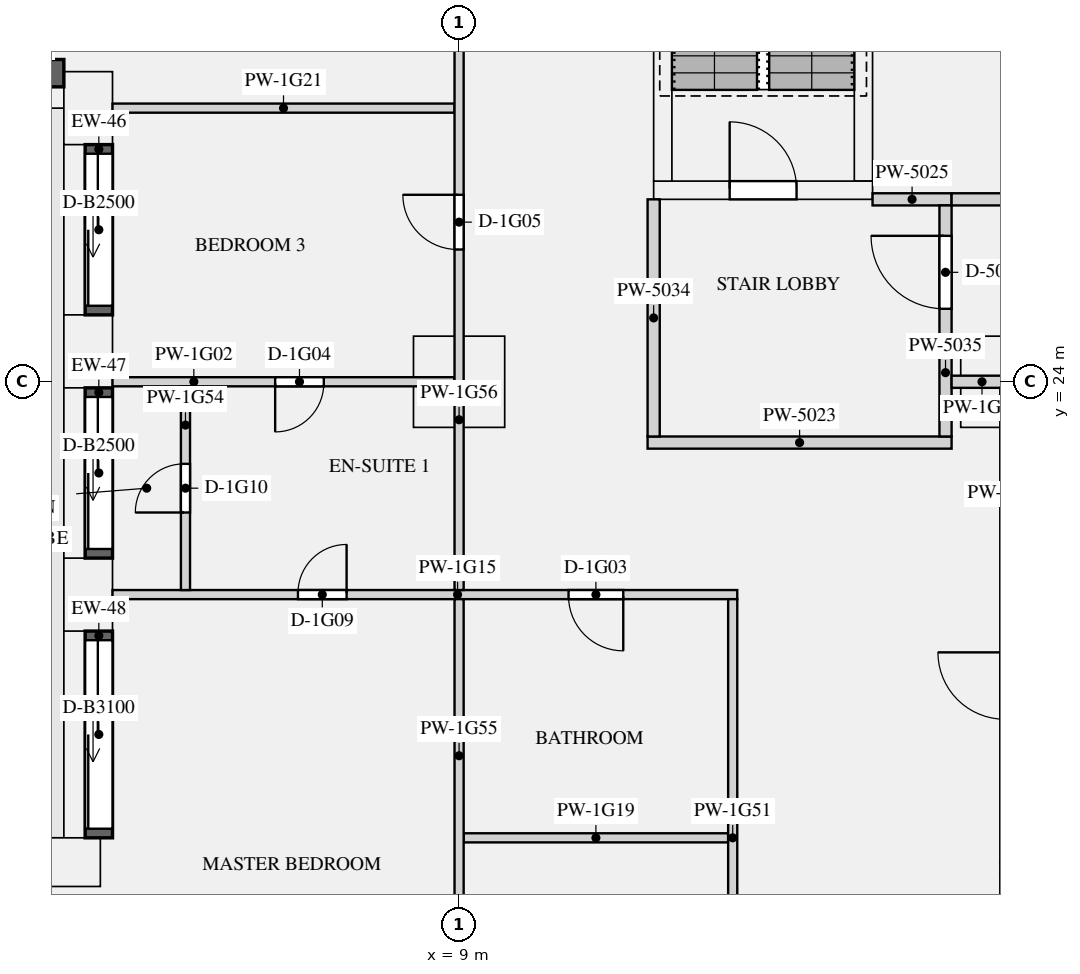
"""IFC4 building model, lengths in metres.
Left out: names, types, materials, properties, quantities, classifications, styles, units other than length and angle.
Written with IfcOpenShell. Run it as: python <this file> out.ifc"""

import sys

from ifc_helpers import new_model, si_unit, direction, frame, frame_2d, origin, origin_2d, place, context, subcontext, project, spatial, rectangle, extrude, element, fill, save


model = new_model("IFC4")
c1 = context("Model", 3, precision=1e-05, world=origin(), true_north=direction((0.0, 1.0)))
c2 = subcontext(c1, "Body", "Model", "MODEL_VIEW")
j1 = project(units=[si_unit("LENGTHUNIT", "METRE"), si_unit("PLANEANGLEUNIT", "RADIAN")], contexts=[c1])
p1 = place(None, origin())
s1 = spatial("IfcSite", under=j1, at=p1, CompositionType="ELEMENT")
p2 = place(p1, origin())
s2 = spatial("IfcBuilding", under=s1, at=p2, CompositionType="ELEMENT")
p3 = place(p2, frame((0.0, 0.0, 69.9)))
s3 = spatial("IfcBuildingStorey", under=s2, at=p3, CompositionType="ELEMENT", Elevation=69.9)
for number, where, z_axis, x_axis in (
    (1, (2.9, 28.5, 0.0), (0.0, 0.0, 1.0), (0.0, -1.0, 0.0)),
    (2, (2.9, 24.5, 0.0), (0.0, 0.0, 1.0), (0.0, -1.0, 0.0)),
    (3, (2.9, 20.5, 0.0), (0.0, 0.0, 1.0), (0.0, -1.0, 0.0)),
    (4, (2.5, 16.1, 0.0), (0.0, 0.0, 1.0), (-1.0, 0.0, 0.0)),
):
    element("IfcColumn", number, at=place(p3, frame(where, z_axis=z_axis, x_axis=x_axis)), inside=s3, PredefinedType="USERDEFINED", context=c2, shape_type="SweptSolid", body=[
        extrude(rectangle(XDim=1.2, YDim=0.8, at=origin_2d()), origin(), (0.0, 0.0, 1.0), 2.65),
    ])
for number, where, z_axis, x_axis in (
    (5, (9.0, 24.0, 0.0), (0.0, 0.0, 1.0), (1.0, 0.0, 0.0)),
    (6, (18.0, 24.0, 0.0), (0.0, 0.0, 1.0), (1.0, 0.0, 0.0)),
):
    element("IfcColumn", number, at=place(p3, frame(where, z_axis=z_axis, x_axis=x_axis)), inside=s3, PredefinedType="COLUMN", context=c2, shape_type="SweptSolid", body=[
        extrude(rectangle(XDim=1.5, YDim=1.5, at=origin_2d()), origin(), (0.0, 0.0, 1.0), 3.15),
    ])
p4 = place(p3, frame((12.2, 27.15, 0.0), z_axis=(0.0, 0.0, 1.0), x_axis=(1.0, 0.0, 0.0)))
e7 = element("IfcWall", 7, at=p4, inside=s3, PredefinedType="SHEAR", context=c2, shape_type="SweptSolid", body=[
    extrude(rectangle(XDim=3.6, YDim=0.3, at=frame_2d((1.8, 0.0))), origin(), (0.0, 0.0, 1.0), 3.15),
])
p5 = place(p4, frame((1.25, 0.0, 0.0)))
e8 = element("IfcOpeningElement", 8, at=p5, cuts=e7, PredefinedType="OPENING", context=c2, shape_type="SweptSolid", body=[
    extrude(rectangle(XDim=1.1, YDim=2.1, at=frame_2d((0.55, 1.05))), frame((0.0, 0.16, 0.0), z_axis=(0.0, -1.0, 0.0), x_axis=(1.0, 0.0, 0.0)), (0.0, 0.0, 1.0), 0.32),
])
for number, where, z_axis, x_axis in (
    (9, (12.35, 27.3, 0.0), (0.0, 0.0, 1.0), (0.0, 1.0, 0.0)),
    (10, (15.65, 27.3, 0.0), (0.0, 0.0, 1.0), (0.0, 1.0, 0.0)),
):
    element("IfcWall", number, at=place(p3, frame(where, z_axis=z_axis, x_axis=x_axis)), inside=s3, PredefinedType="SHEAR", context=c2, shape_type="SweptSolid", body=[
        extrude(rectangle(XDim=7.8, YDim=0.3, at=frame_2d((3.9, 0.0))), origin(), (0.0, 0.0, 1.0), 3.15),
    ])
p6 = place(p3, frame((1.2, 29.075, 0.9), z_axis=(0.0, 0.0, 1.0), x_axis=(1.0, 0.0, 0.0)))
e11 = element("IfcWall", 11, at=p6, inside=s3, PredefinedType="SOLIDWALL", context=c2, shape_type="SweptSolid", body=[
    extrude(rectangle(XDim=1.3, YDim=0.45, at=frame_2d((0.65, 0.0))), origin(), (0.0, 0.0, 1.0), 1.75),
])
p7 = place(p3, frame((3.075, 27.9, 0.0), z_axis=(0.0, 0.0, 1.0), x_axis=(0.0, -1.0, 0.0)))
e12 = element("IfcWall", 12, at=p7, inside=s3, PredefinedType="SOLIDWALL", context=c2, shape_type="SweptSolid", body=[
    extrude(rectangle(XDim=2.8, YDim=0.45, at=frame_2d((1.4, 0.0))), origin(), (0.0, 0.0, 1.0), 2.65),
])
p8 = place(p7, frame((0.15, 0.0, 0.0)))
e13 = element("IfcOpeningElement", 13, at=p8, cuts=e12, PredefinedType="OPENING", context=c2, shape_type="SweptSolid", body=[
    extrude(rectangle(XDim=2.5, YDim=2.3, at=frame_2d((1.25, 1.15))), frame((0.0, 0.235, 0.0), z_axis=(0.0, -1.0, 0.0), x_axis=(1.0, 0.0, 0.0)), (0.0, 0.0, 1.0), 0.47),
])
p9 = place(p3, frame((3.075, 23.9, 0.0), z_axis=(0.0, 0.0, 1.0), x_axis=(0.0, -1.0, 0.0)))
e14 = element("IfcWall", 14, at=p9, inside=s3, PredefinedType="SOLIDWALL", context=c2, shape_type="SweptSolid", body=[
    extrude(rectangle(XDim=2.8, YDim=0.45, at=frame_2d((1.4, 0.0))), origin(), (0.0, 0.0, 1.0), 2.65),
])
p10 = place(p9, frame((0.15, 0.0, 0.0)))
e15 = element("IfcOpeningElement", 15, at=p10, cuts=e14, PredefinedType="OPENING", context=c2, shape_type="SweptSolid", body=[
    extrude(rectangle(XDim=2.5, YDim=2.3, at=frame_2d((1.25, 1.15))), frame((0.0, 0.235, 0.0), z_axis=(0.0, -1.0, 0.0), x_axis=(1.0, 0.0, 0.0)), (0.0, 0.0, 1.0), 0.47),
])
p11 = place(p3, frame((3.075, 19.9, 0.0), z_axis=(0.0, 0.0, 1.0), x_axis=(0.0, -1.0, 0.0)))
e16 = element("IfcWall", 16, at=p11, inside=s3, PredefinedType="SOLIDWALL", context=c2, shape_type="SweptSolid", body=[
    extrude(rectangle(XDim=3.4, YDim=0.45, at=frame_2d((1.7, 0.0))), origin(), (0.0, 0.0, 1.0), 2.65),
])
p12 = place(p11, frame((0.15, 0.0, 0.0)))
e17 = element("IfcOpeningElement", 17, at=p12, cuts=e16, PredefinedType="OPENING", context=c2, shape_type="SweptSolid", body=[
    extrude(rectangle(XDim=3.1, YDim=2.3, at=frame_2d((1.55, 1.15))), frame((0.0, 0.235, 0.0), z_axis=(0.0, -1.0, 0.0), x_axis=(1.0, 0.0, 0.0)), (0.0, 0.0, 1.0), 0.47),
])
p13 = place(p3, frame((12.1, 23.0, 0.0), z_axis=(0.0, 0.0, 1.0), x_axis=(1.0, 0.0, 0.0)))
e18 = element("IfcWall", 18, at=p13, inside=s3, PredefinedType="PARTITIONING", context=c2, shape_type="SweptSolid", body=[
    extrude(rectangle(XDim=5.0, YDim=0.2, at=frame_2d((2.5, 0.0))), origin(), (0.0, 0.0, 1.0), 2.65),
])
p14 = place(p3, frame((15.8, 27.0, 0.0), z_axis=(0.0, 0.0, 1.0), x_axis=(1.0, 0.0, 0.0)))
e19 = element("IfcWall", 19, at=p14, inside=s3, PredefinedType="PARTITIONING", context=c2, shape_type="SweptSolid", body=[
    extrude(rectangle(XDim=1.3, YDim=0.2, at=frame_2d((0.65, 0.0))), origin(), (0.0, 0.0, 1.0), 2.65),
])
p15 = place(p3, frame((12.2, 23.1, 0.0), z_axis=(0.0, 0.0, 1.0), x_axis=(0.0, 1.0, 0.0)))
e20 = element("IfcWall", 20, at=p15, inside=s3, PredefinedType="PARTITIONING", context=c2, shape_type="SweptSolid", body=[
    extrude(rectangle(XDim=3.9, YDim=0.2, at=frame_2d((1.95, 0.0))), origin(), (0.0, 0.0, 1.0), 2.65),
])
p16 = place(p3, frame((17.0, 23.1, 0.0), z_axis=(0.0, 0.0, 1.0), x_axis=(0.0, 1.0, 0.0)))
e21 = element("IfcWall", 21, at=p16, inside=s3, PredefinedType="PARTITIONING", context=c2, shape_type="SweptSolid", body=[
    extrude(rectangle(XDim=3.8, YDim=0.2, at=frame_2d((1.9, 0.0))), origin(), (0.0, 0.0, 1.0), 2.65),
])
p17 = place(p16, frame((2.1, 0.0, 0.0)))
e22 = element("IfcOpeningElement", 22, at=p17, cuts=e21, PredefinedType="OPENING", context=c2, shape_type="SweptSolid", body=[
    extrude(rectangle(XDim=1.2, YDim=2.1, at=frame_2d((0.6, 1.05))), frame((0.0, 0.11, 0.0), z_axis=(0.0, -1.0, 0.0), x_axis=(1.0, 0.0, 0.0)), (0.0, 0.0, 1.0), 0.22),
])
p18 = place(p3, frame((3.3, 24.0, 0.0), z_axis=(0.0, 0.0, 1.0), x_axis=(1.0, 0.0, 0.0)))
e23 = element("IfcWall", 23, at=p18, inside=s3, PredefinedType="PARTITIONING", context=c2, shape_type="SweptSolid", body=[
    extrude(rectangle(XDim=5.625, YDim=0.15, at=frame_2d((2.812, 0.0))), origin(), (0.0, 0.0, 1.0), 2.65),
])
p19 = place(p18, frame((2.675, 0.0, 0.0)))
e24 = element("IfcOpeningElement", 24, at=p19, cuts=e23, PredefinedType="OPENING", context=c2, shape_type="SweptSolid", body=[
    extrude(rectangle(XDim=0.8, YDim=2.1, at=frame_2d((0.4, 1.05))), frame((0.0, 0.085, 0.0), z_axis=(0.0, -1.0, 0.0), x_axis=(1.0, 0.0, 0.0)), (0.0, 0.0, 1.0), 0.17),
])
p20 = place(p3, frame((17.1, 24.0, 0.0), z_axis=(0.0, 0.0, 1.0), x_axis=(1.0, 0.0, 0.0)))
e25 = element("IfcWall", 25, at=p20, inside=s3, PredefinedType="PARTITIONING", context=c2, shape_type="SweptSolid", body=[
    extrude(rectangle(XDim=1.0, YDim=0.2, at=frame_2d((0.5, 0.0))), origin(), (0.0, 0.0, 1.0), 2.65),
])
p21 = place(p3, frame((17.1, 27.0, 0.0), z_axis=(0.0, 0.0, 1.0), x_axis=(1.0, 0.0, 0.0)))
e26 = element("IfcWall", 26, at=p21, inside=s3, PredefinedType="PARTITIONING", context=c2, shape_type="SweptSolid", body=[
    extrude(rectangle(XDim=7.0, YDim=0.2, at=frame_2d((3.5, 0.0))), origin(), (0.0, 0.0, 1.0), 2.65),
])
p22 = place(p3, frame((3.3, 20.5, 0.0), z_axis=(0.0, 0.0, 1.0), x_axis=(1.0, 0.0, 0.0)))
e27 = element("IfcWall", 27, at=p22, inside=s3, PredefinedType="PARTITIONING", context=c2, shape_type="SweptSolid", body=[
    extrude(rectangle(XDim=10.275, YDim=0.15, at=frame_2d((5.137, 0.0))), origin(), (0.0, 0.0, 1.0), 2.65),
])
p23 = place(p22, frame((7.5, 0.0, 0.0)))
e28 = element("IfcOpeningElement", 28, at=p23, cuts=e27, PredefinedType="OPENING", context=c2, shape_type="SweptSolid", body=[
    extrude(rectangle(XDim=0.9, YDim=2.1, at=frame_2d((0.45, 1.05))), frame((0.0, 0.085, 0.0), z_axis=(0.0, -1.0, 0.0), x_axis=(1.0, 0.0, 0.0)), (0.0, 0.0, 1.0), 0.17),
])
p24 = place(p22, frame((3.05, 0.0, 0.0)))
e29 = element("IfcOpeningElement", 29, at=p24, cuts=e27, PredefinedType="OPENING", context=c2, shape_type="SweptSolid", body=[
    extrude(rectangle(XDim=0.8, YDim=2.1, at=frame_2d((0.4, 1.05))), frame((0.0, 0.085, 0.0), z_axis=(0.0, -1.0, 0.0), x_axis=(1.0, 0.0, 0.0)), (0.0, 0.0, 1.0), 0.17),
])
p25 = place(p3, frame((9.075, 16.5, 0.0), z_axis=(0.0, 0.0, 1.0), x_axis=(1.0, 0.0, 0.0)))
e30 = element("IfcWall", 30, at=p25, inside=s3, PredefinedType="PARTITIONING", context=c2, shape_type="SweptSolid", body=[
    extrude(rectangle(XDim=4.35, YDim=0.15, at=frame_2d((2.175, 0.0))), origin(), (0.0, 0.0, 1.0), 2.65),
])
p26 = place(p3, frame((3.3, 28.5, 0.0), z_axis=(0.0, 0.0, 1.0), x_axis=(1.0, 0.0, 0.0)))
e31 = element("IfcWall", 31, at=p26, inside=s3, PredefinedType="PARTITIONING", context=c2, shape_type="SweptSolid", body=[
    extrude(rectangle(XDim=5.625, YDim=0.15, at=frame_2d((2.812, 0.0))), origin(), (0.0, 0.0, 1.0), 2.65),
])
p27 = place(p3, frame((13.5, 12.575, 0.0), z_axis=(0.0, 0.0, 1.0), x_axis=(0.0, 1.0, 0.0)))
e32 = element("IfcWall", 32, at=p27, inside=s3, PredefinedType="PARTITIONING", context=c2, shape_type="SweptSolid", body=[
    extrude(rectangle(XDim=7.85, YDim=0.15, at=frame_2d((3.925, 0.0))), origin(), (0.0, 0.0, 1.0), 2.65),
])
p28 = place(p3, frame((4.5, 20.575, 0.0), z_axis=(0.0, 0.0, 1.0), x_axis=(0.0, 1.0, 0.0)))
e33 = element("IfcWall", 33, at=p28, inside=s3, PredefinedType="PARTITIONING", context=c2, shape_type="SweptSolid", body=[
    extrude(rectangle(XDim=3.35, YDim=0.15, at=frame_2d((1.675, 0.0))), origin(), (0.0, 0.0, 1.0), 2.65),
])
p29 = place(p28, frame((1.275, 0.0, 0.0)))
e34 = element("IfcOpeningElement", 34, at=p29, cuts=e33, PredefinedType="OPENING", context=c2, shape_type="SweptSolid", body=[
    extrude(rectangle(XDim=0.8, YDim=2.1, at=frame_2d((0.4, 1.05))), frame((0.0, 0.085, 0.0), z_axis=(0.0, -1.0, 0.0), x_axis=(1.0, 0.0, 0.0)), (0.0, 0.0, 1.0), 0.17),
])
p30 = place(p3, frame((9.0, 12.575, 0.0), z_axis=(0.0, 0.0, 1.0), x_axis=(0.0, 1.0, 0.0)))
e35 = element("IfcWall", 35, at=p30, inside=s3, PredefinedType="PARTITIONING", context=c2, shape_type="SweptSolid", body=[
    extrude(rectangle(XDim=7.85, YDim=0.15, at=frame_2d((3.925, 0.0))), origin(), (0.0, 0.0, 1.0), 2.65),
])
p31 = place(p30, frame((1.9, 0.0, 0.0)))
e36 = element("IfcOpeningElement", 36, at=p31, cuts=e35, PredefinedType="OPENING", context=c2, shape_type="SweptSolid", body=[
    extrude(rectangle(XDim=0.8, YDim=2.1, at=frame_2d((0.4, 1.05))), frame((0.0, 0.085, 0.0), z_axis=(0.0, -1.0, 0.0), x_axis=(1.0, 0.0, 0.0)), (0.0, 0.0, 1.0), 0.17),
])
p32 = place(p3, frame((9.0, 20.575, 0.0), z_axis=(0.0, 0.0, 1.0), x_axis=(0.0, 1.0, 0.0)))
e37 = element("IfcWall", 37, at=p32, inside=s3, PredefinedType="PARTITIONING", context=c2, shape_type="SweptSolid", body=[
    extrude(rectangle(XDim=11.725, YDim=0.15, at=frame_2d((5.863, 0.0))), origin(), (0.0, 0.0, 1.0), 2.65),
])
p33 = place(p32, frame((5.6, 0.0, 0.0)))
e38 = element("IfcOpeningElement", 38, at=p33, cuts=e37, PredefinedType="OPENING", context=c2, shape_type="SweptSolid", body=[
    extrude(rectangle(XDim=0.9, YDim=2.1, at=frame_2d((0.45, 1.05))), frame((0.0, 0.085, 0.0), z_axis=(0.0, -1.0, 0.0), x_axis=(1.0, 0.0, 0.0)), (0.0, 0.0, 1.0), 0.17),
])
p34 = place(p32, frame((9.413, 0.0, 0.0)))
e39 = element("IfcOpeningElement", 39, at=p34, cuts=e37, PredefinedType="OPENING", context=c2, shape_type="SweptSolid", body=[
    extrude(rectangle(XDim=0.9, YDim=2.1, at=frame_2d((0.45, 1.05))), frame((0.0, 0.085, 0.0), z_axis=(0.0, -1.0, 0.0), x_axis=(1.0, 0.0, 0.0)), (0.0, 0.0, 1.0), 0.17),
])
p35 = place(p8, origin())
e40 = element("IfcDoor", 40, at=p35, inside=s3, OperationType="SLIDING_TO_LEFT", PredefinedType="DOOR", context=c2, shape_type="SweptSolid", body=[
    extrude(rectangle(XDim=2.5, YDim=2.3, at=frame_2d((1.25, 1.15))), frame((0.0, -0.07, 0.0), z_axis=(0.0, -1.0, 0.0), x_axis=(1.0, 0.0, 0.0)), (0.0, 0.0, 1.0), 0.05),
])
fill(e13, e40)
p36 = place(p10, origin())
e41 = element("IfcDoor", 41, at=p36, inside=s3, OperationType="SLIDING_TO_LEFT", PredefinedType="DOOR", context=c2, shape_type="SweptSolid", body=[
    extrude(rectangle(XDim=2.5, YDim=2.3, at=frame_2d((1.25, 1.15))), frame((0.0, -0.07, 0.0), z_axis=(0.0, -1.0, 0.0), x_axis=(1.0, 0.0, 0.0)), (0.0, 0.0, 1.0), 0.05),
])
fill(e15, e41)
p37 = place(p12, origin())
e42 = element("IfcDoor", 42, at=p37, inside=s3, OperationType="SLIDING_TO_LEFT", PredefinedType="DOOR", context=c2, shape_type="SweptSolid", body=[
    extrude(rectangle(XDim=3.1, YDim=2.3, at=frame_2d((1.55, 1.15))), frame((0.0, -0.07, 0.0), z_axis=(0.0, -1.0, 0.0), x_axis=(1.0, 0.0, 0.0)), (0.0, 0.0, 1.0), 0.05),
])
fill(e17, e42)
p38 = place(p5, origin())
e43 = element("IfcDoor", 43, at=p38, inside=s3, OperationType="SINGLE_SWING_LEFT", PredefinedType="DOOR", context=c2, shape_type="SweptSolid", body=[
    extrude(rectangle(XDim=1.1, YDim=2.1, at=frame_2d((0.55, 1.05))), frame((0.0, 0.025, 0.0), z_axis=(0.0, -1.0, 0.0), x_axis=(1.0, 0.0, 0.0)), (0.0, 0.0, 1.0), 0.05),
])
fill(e8, e43)
p39 = place(p17, origin())
e44 = element("IfcDoor", 44, at=p39, inside=s3, OperationType="SINGLE_SWING_RIGHT", PredefinedType="DOOR", context=c2, shape_type="SweptSolid", body=[
    extrude(rectangle(XDim=1.2, YDim=2.1, at=frame_2d((0.6, 1.05))), frame((0.0, 0.025, 0.0), z_axis=(0.0, -1.0, 0.0), x_axis=(1.0, 0.0, 0.0)), (0.0, 0.0, 1.0), 0.05),
])
fill(e22, e44)
p40 = place(p23, frame((0.9, 0.0, 0.0), z_axis=(0.0, 0.0, 1.0), x_axis=(-1.0, 0.0, 0.0)))
e45 = element("IfcDoor", 45, at=p40, inside=s3, OperationType="SINGLE_SWING_LEFT", PredefinedType="DOOR", context=c2, shape_type="SweptSolid", body=[
    extrude(rectangle(XDim=0.9, YDim=2.1, at=frame_2d((0.45, 1.05))), frame((0.0, 0.025, 0.0), z_axis=(0.0, -1.0, 0.0), x_axis=(1.0, 0.0, 0.0)), (0.0, 0.0, 1.0), 0.05),
])
fill(e28, e45)
p41 = place(p19, frame((0.8, 0.0, 0.0), z_axis=(0.0, 0.0, 1.0), x_axis=(-1.0, 0.0, 0.0)))
e46 = element("IfcDoor", 46, at=p41, inside=s3, OperationType="SINGLE_SWING_RIGHT", PredefinedType="DOOR", context=c2, shape_type="SweptSolid", body=[
    extrude(rectangle(XDim=0.8, YDim=2.1, at=frame_2d((0.4, 1.05))), frame((0.0, 0.025, 0.0), z_axis=(0.0, -1.0, 0.0), x_axis=(1.0, 0.0, 0.0)), (0.0, 0.0, 1.0), 0.05),
])
fill(e24, e46)
p42 = place(p33, origin())
e47 = element("IfcDoor", 47, at=p42, inside=s3, OperationType="SINGLE_SWING_RIGHT", PredefinedType="DOOR", context=c2, shape_type="SweptSolid", body=[
    extrude(rectangle(XDim=0.9, YDim=2.1, at=frame_2d((0.45, 1.05))), frame((0.0, 0.025, 0.0), z_axis=(0.0, -1.0, 0.0), x_axis=(1.0, 0.0, 0.0)), (0.0, 0.0, 1.0), 0.05),
])
fill(e38, e47)
p43 = place(p24, origin())
e48 = element("IfcDoor", 48, at=p43, inside=s3, OperationType="SINGLE_SWING_RIGHT", PredefinedType="DOOR", context=c2, shape_type="SweptSolid", body=[
    extrude(rectangle(XDim=0.8, YDim=2.1, at=frame_2d((0.4, 1.05))), frame((0.0, 0.025, 0.0), z_axis=(0.0, -1.0, 0.0), x_axis=(1.0, 0.0, 0.0)), (0.0, 0.0, 1.0), 0.05),
])
fill(e29, e48)
p44 = place(p29, origin())
e49 = element("IfcDoor", 49, at=p44, inside=s3, OperationType="SINGLE_SWING_LEFT", PredefinedType="DOOR", context=c2, shape_type="SweptSolid", body=[
    extrude(rectangle(XDim=0.8, YDim=2.1, at=frame_2d((0.4, 1.05))), frame((0.0, 0.025, 0.0), z_axis=(0.0, -1.0, 0.0), x_axis=(1.0, 0.0, 0.0)), (0.0, 0.0, 1.0), 0.05),
])
fill(e34, e49)
save(model, sys.argv[1])
